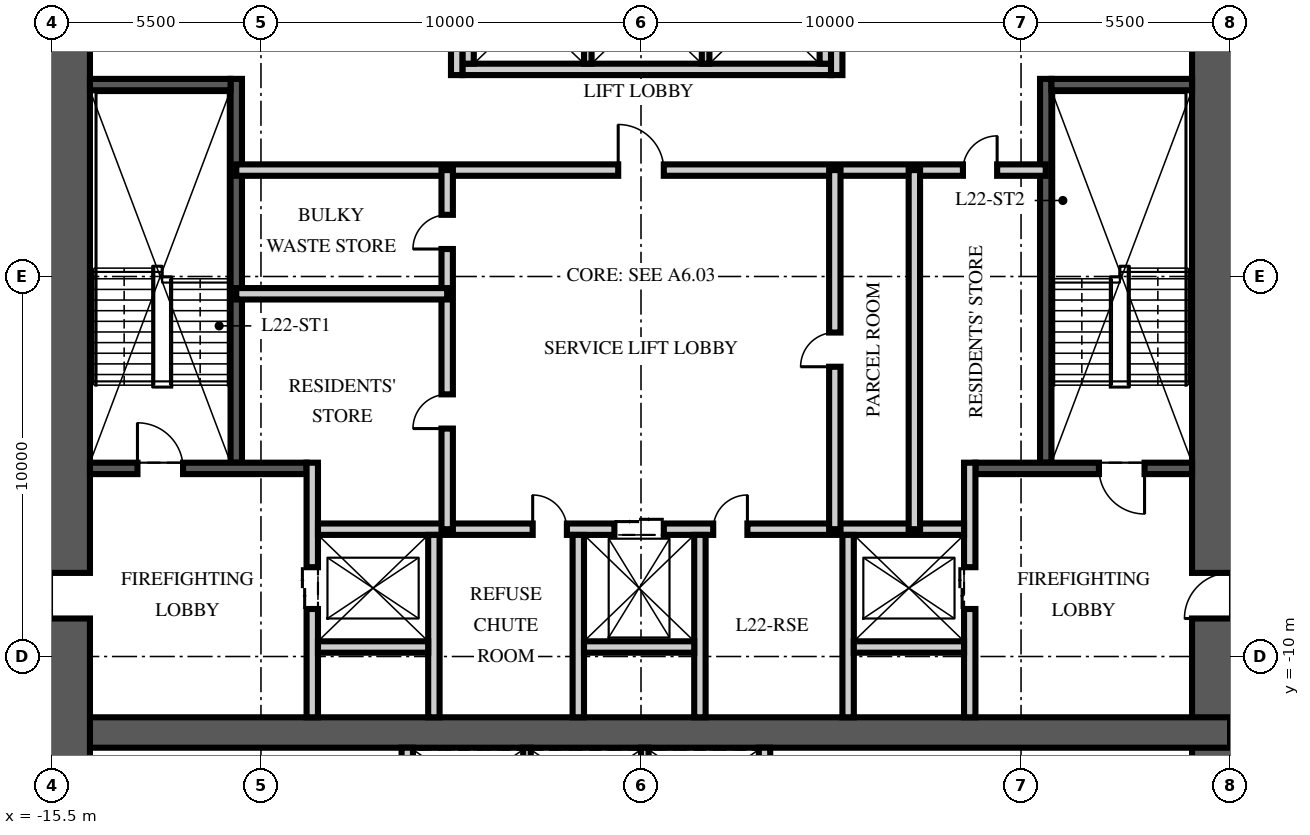
"""IFC4 building model, lengths in metres.
Left out: names, types, materials, properties, quantities, classifications, styles, units other than length and angle.
Written with IfcOpenShell. Run it as: python <this file> out.ifc"""

import sys

from ifc_helpers import new_model, si_unit, direction, frame, frame_2d, origin, place, context, subcontext, project, spatial, rectangle, extrude, element, fill, save


model = new_model("IFC4")
c1 = context("Model", 3, precision=1e-05, world=origin(), true_north=direction((0.0, 1.0)))
c2 = subcontext(c1, "Body", "Model", "MODEL_VIEW")
j1 = project(units=[si_unit("LENGTHUNIT", "METRE"), si_unit("PLANEANGLEUNIT", "RADIAN")], contexts=[c1])
p1 = place(None, origin())
s1 = spatial("IfcSite", under=j1, at=p1, CompositionType="ELEMENT")
p2 = place(p1, origin())
s2 = spatial("IfcBuilding", under=s1, at=p2, CompositionType="ELEMENT")
p3 = place(p2, frame((0.0, 0.0, 88.5)))
s3 = spatial("IfcBuildingStorey", under=s2, at=p3, CompositionType="ELEMENT", Elevation=88.5)
p4 = place(p3, frame((15.5, -15.5, -0.25), z_axis=(0.0, 0.0, 1.0), x_axis=(0.0, 1.0, 0.0)))
e1 = element("IfcWall", 1, at=p4, inside=s3, PredefinedType="SHEAR", context=c2, shape_type="SweptSolid", body=[
    extrude(rectangle(XDim=31.0, YDim=2.0, at=frame_2d((15.5, 0.0))), origin(), (0.0, 0.0, 1.0), 3.75),
])
p5 = place(p4, frame((6.5, 0.0, 0.25)))
e2 = element("IfcOpeningElement", 2, at=p5, cuts=e1, PredefinedType="OPENING", context=c2, shape_type="SweptSolid", body=[
    extrude(rectangle(XDim=1.2, YDim=2.1, at=frame_2d((0.6, 1.05))), frame((0.0, 1.01, 0.0), z_axis=(0.0, -1.0, 0.0), x_axis=(1.0, 0.0, 0.0)), (0.0, 0.0, 1.0), 2.02),
])
p6 = place(p4, frame((23.0, 0.0, 0.25)))
e3 = element("IfcOpeningElement", 3, at=p6, cuts=e1, PredefinedType="OPENING", context=c2, shape_type="SweptSolid", body=[
    extrude(rectangle(XDim=1.8, YDim=2.1, at=frame_2d((0.9, 1.05))), frame((0.0, 1.01, 0.0), z_axis=(0.0, -1.0, 0.0), x_axis=(1.0, 0.0, 0.0)), (0.0, 0.0, 1.0), 2.02),
])
p7 = place(p3, frame((-15.5, -12.0, -0.25), z_axis=(0.0, 0.0, 1.0), x_axis=(1.0, 0.0, 0.0)))
e4 = element("IfcWall", 4, at=p7, inside=s3, PredefinedType="SHEAR", context=c2, shape_type="SweptSolid", body=[
    extrude(rectangle(XDim=31.0, YDim=0.8, at=frame_2d((15.5, 0.0))), origin(), (0.0, 0.0, 1.0), 3.75),
])
p8 = place(p3, frame((-15.5, -15.5, -0.25), z_axis=(0.0, 0.0, 1.0), x_axis=(0.0, 1.0, 0.0)))
e5 = element("IfcWall", 5, at=p8, inside=s3, PredefinedType="SHEAR", context=c2, shape_type="SweptSolid", body=[
    extrude(rectangle(XDim=31.0, YDim=2.0, at=frame_2d((15.5, 0.0))), origin(), (0.0, 0.0, 1.0), 3.75),
])
p9 = place(p8, frame((6.5, 0.0, 0.25)))
e6 = element("IfcOpeningElement", 6, at=p9, cuts=e5, PredefinedType="OPENING", context=c2, shape_type="SweptSolid", body=[
    extrude(rectangle(XDim=1.2, YDim=2.1, at=frame_2d((0.6, 1.05))), frame((0.0, 1.01, 0.0), z_axis=(0.0, -1.0, 0.0), x_axis=(1.0, 0.0, 0.0)), (0.0, 0.0, 1.0), 2.02),
])
p10 = place(p8, frame((23.0, 0.0, 0.25)))
e7 = element("IfcOpeningElement", 7, at=p10, cuts=e5, PredefinedType="OPENING", context=c2, shape_type="SweptSolid", body=[
    extrude(rectangle(XDim=1.8, YDim=2.1, at=frame_2d((0.9, 1.05))), frame((0.0, 1.01, 0.0), z_axis=(0.0, -1.0, 0.0), x_axis=(1.0, 0.0, 0.0)), (0.0, 0.0, 1.0), 2.02),
])
p11 = place(p3, frame((-10.65, -4.9, 0.0), z_axis=(0.0, 0.0, 1.0), x_axis=(0.0, 1.0, 0.0)))
e8 = element("IfcWall", 8, at=p11, inside=s3, PredefinedType="SOLIDWALL", context=c2, shape_type="SweptSolid", body=[
    extrude(rectangle(XDim=10.1, YDim=0.3, at=frame_2d((5.05, 0.0))), origin(), (0.0, 0.0, 1.0), 3.5),
])
p12 = place(p3, frame((-14.5, -5.05, 0.0), z_axis=(0.0, 0.0, 1.0), x_axis=(1.0, 0.0, 0.0)))
e9 = element("IfcWall", 9, at=p12, inside=s3, PredefinedType="SOLIDWALL", context=c2, shape_type="SweptSolid", body=[
    extrude(rectangle(XDim=5.7, YDim=0.3, at=frame_2d((2.85, 0.0))), origin(), (0.0, 0.0, 1.0), 3.5),
])
p13 = place(p12, frame((1.25, 0.0, 0.0)))
e10 = element("IfcOpeningElement", 10, at=p13, cuts=e9, PredefinedType="OPENING", context=c2, shape_type="SweptSolid", body=[
    extrude(rectangle(XDim=1.2, YDim=2.1, at=frame_2d((0.6, 1.05))), frame((0.0, 0.16, 0.0), z_axis=(0.0, -1.0, 0.0), x_axis=(1.0, 0.0, 0.0)), (0.0, 0.0, 1.0), 0.32),
])
p14 = place(p3, frame((-14.5, 5.05, 0.0), z_axis=(0.0, 0.0, 1.0), x_axis=(1.0, 0.0, 0.0)))
e11 = element("IfcWall", 11, at=p14, inside=s3, PredefinedType="SOLIDWALL", context=c2, shape_type="SweptSolid", body=[
    extrude(rectangle(XDim=3.7, YDim=0.3, at=frame_2d((1.85, 0.0))), origin(), (0.0, 0.0, 1.0), 3.5),
])
p15 = place(p3, frame((-8.65, -11.6, 0.0), z_axis=(0.0, 0.0, 1.0), x_axis=(0.0, 1.0, 0.0)))
e12 = element("IfcWall", 12, at=p15, inside=s3, PredefinedType="PARTITIONING", context=c2, shape_type="SweptSolid", body=[
    extrude(rectangle(XDim=6.7, YDim=0.3, at=frame_2d((3.35, 0.0))), origin(), (0.0, 0.0, 1.0), 3.5),
])
p16 = place(p15, frame((2.85, 0.0, 0.0)))
e13 = element("IfcOpeningElement", 13, at=p16, cuts=e12, PredefinedType="OPENING", context=c2, shape_type="SweptSolid", body=[
    extrude(rectangle(XDim=1.1, YDim=2.1, at=frame_2d((0.55, 1.05))), frame((0.0, 0.16, 0.0), z_axis=(0.0, -1.0, 0.0), x_axis=(1.0, 0.0, 0.0)), (0.0, 0.0, 1.0), 0.32),
])
p17 = place(p3, frame((10.65, -4.9, 0.0), z_axis=(0.0, 0.0, 1.0), x_axis=(0.0, 1.0, 0.0)))
e14 = element("IfcWall", 14, at=p17, inside=s3, PredefinedType="SOLIDWALL", context=c2, shape_type="SweptSolid", body=[
    extrude(rectangle(XDim=10.1, YDim=0.3, at=frame_2d((5.05, 0.0))), origin(), (0.0, 0.0, 1.0), 3.5),
])
p18 = place(p3, frame((14.5, -5.05, 0.0), z_axis=(0.0, 0.0, 1.0), x_axis=(-1.0, 0.0, 0.0)))
e15 = element("IfcWall", 15, at=p18, inside=s3, PredefinedType="SOLIDWALL", context=c2, shape_type="SweptSolid", body=[
    extrude(rectangle(XDim=5.7, YDim=0.3, at=frame_2d((2.85, 0.0))), origin(), (0.0, 0.0, 1.0), 3.5),
])
p19 = place(p18, frame((1.25, 0.0, 0.0)))
e16 = element("IfcOpeningElement", 16, at=p19, cuts=e15, PredefinedType="OPENING", context=c2, shape_type="SweptSolid", body=[
    extrude(rectangle(XDim=1.2, YDim=2.1, at=frame_2d((0.6, 1.05))), frame((0.0, 0.16, 0.0), z_axis=(0.0, -1.0, 0.0), x_axis=(1.0, 0.0, 0.0)), (0.0, 0.0, 1.0), 0.32),
])
p20 = place(p3, frame((14.5, 5.05, 0.0), z_axis=(0.0, 0.0, 1.0), x_axis=(-1.0, 0.0, 0.0)))
e17 = element("IfcWall", 17, at=p20, inside=s3, PredefinedType="SOLIDWALL", context=c2, shape_type="SweptSolid", body=[
    extrude(rectangle(XDim=3.7, YDim=0.3, at=frame_2d((1.85, 0.0))), origin(), (0.0, 0.0, 1.0), 3.5),
])
p21 = place(p3, frame((8.65, -11.6, 0.0), z_axis=(0.0, 0.0, 1.0), x_axis=(0.0, 1.0, 0.0)))
e18 = element("IfcWall", 18, at=p21, inside=s3, PredefinedType="PARTITIONING", context=c2, shape_type="SweptSolid", body=[
    extrude(rectangle(XDim=6.7, YDim=0.3, at=frame_2d((3.35, 0.0))), origin(), (0.0, 0.0, 1.0), 3.5),
])
p22 = place(p21, frame((2.85, 0.0, 0.0)))
e19 = element("IfcOpeningElement", 19, at=p22, cuts=e18, PredefinedType="OPENING", context=c2, shape_type="SweptSolid", body=[
    extrude(rectangle(XDim=1.1, YDim=2.1, at=frame_2d((0.55, 1.05))), frame((0.0, 0.16, 0.0), z_axis=(0.0, -1.0, 0.0), x_axis=(1.0, 0.0, 0.0)), (0.0, 0.0, 1.0), 0.32),
])
p23 = place(p3, frame((-8.5, -6.65, 0.0), z_axis=(0.0, 0.0, 1.0), x_axis=(1.0, 0.0, 0.0)))
e20 = element("IfcWall", 20, at=p23, inside=s3, PredefinedType="PARTITIONING", context=c2, shape_type="SweptSolid", body=[
    extrude(rectangle(XDim=17.0, YDim=0.3, at=frame_2d((8.5, 0.0))), origin(), (0.0, 0.0, 1.0), 3.5),
])
p24 = place(p23, frame((7.8, 0.0, 0.0)))
e21 = element("IfcOpeningElement", 21, at=p24, cuts=e20, PredefinedType="OPENING", context=c2, shape_type="SweptSolid", body=[
    extrude(rectangle(XDim=1.3, YDim=2.4, at=frame_2d((0.65, 1.2))), frame((0.0, 0.16, 0.0), z_axis=(0.0, -1.0, 0.0), x_axis=(1.0, 0.0, 0.0)), (0.0, 0.0, 1.0), 0.32),
])
p25 = place(p23, frame((5.65, 0.0, 0.0)))
e22 = element("IfcOpeningElement", 22, at=p25, cuts=e20, PredefinedType="OPENING", context=c2, shape_type="SweptSolid", body=[
    extrude(rectangle(XDim=0.9, YDim=2.1, at=frame_2d((0.45, 1.05))), frame((0.0, 0.16, 0.0), z_axis=(0.0, -1.0, 0.0), x_axis=(1.0, 0.0, 0.0)), (0.0, 0.0, 1.0), 0.32),
])
p26 = place(p23, frame((10.4, 0.0, 0.0)))
e23 = element("IfcOpeningElement", 23, at=p26, cuts=e20, PredefinedType="OPENING", context=c2, shape_type="SweptSolid", body=[
    extrude(rectangle(XDim=0.9, YDim=2.1, at=frame_2d((0.45, 1.05))), frame((0.0, 0.16, 0.0), z_axis=(0.0, -1.0, 0.0), x_axis=(1.0, 0.0, 0.0)), (0.0, 0.0, 1.0), 0.32),
])
for number, where, z_axis, x_axis in (
    (24, (-5.45, -11.6, 0.0), (0.0, 0.0, 1.0), (0.0, 1.0, 0.0)),
    (25, (-1.65, -11.6, 0.0), (0.0, 0.0, 1.0), (0.0, 1.0, 0.0)),
    (26, (1.55, -11.6, 0.0), (0.0, 0.0, 1.0), (0.0, 1.0, 0.0)),
    (27, (5.45, -11.6, 0.0), (0.0, 0.0, 1.0), (0.0, 1.0, 0.0)),
):
    element("IfcWall", number, at=place(p3, frame(where, z_axis=z_axis, x_axis=x_axis)), inside=s3, PredefinedType="PARTITIONING", context=c2, shape_type="SweptSolid", body=[
        extrude(rectangle(XDim=4.8, YDim=0.3, at=frame_2d((2.4, 0.0))), origin(), (0.0, 0.0, 1.0), 3.5),
    ])
for number, where, z_axis, x_axis in (
    (28, (-8.5, -9.75, 0.0), (0.0, 0.0, 1.0), (1.0, 0.0, 0.0)),
    (29, (-1.5, -9.75, 0.0), (0.0, 0.0, 1.0), (1.0, 0.0, 0.0)),
    (30, (5.6, -9.75, 0.0), (0.0, 0.0, 1.0), (1.0, 0.0, 0.0)),
):
    element("IfcWall", number, at=place(p3, frame(where, z_axis=z_axis, x_axis=x_axis)), inside=s3, PredefinedType="PARTITIONING", context=c2, shape_type="SweptSolid", body=[
        extrude(rectangle(XDim=2.9, YDim=0.3, at=frame_2d((1.45, 0.0))), origin(), (0.0, 0.0, 1.0), 3.5),
    ])
p27 = place(p3, frame((-4.7, 5.45, 0.0), z_axis=(0.0, 0.0, 1.0), x_axis=(1.0, 0.0, 0.0)))
e31 = element("IfcWall", 31, at=p27, inside=s3, PredefinedType="PARTITIONING", context=c2, shape_type="SweptSolid", body=[
    extrude(rectangle(XDim=9.7, YDim=0.3, at=frame_2d((4.85, 0.0))), origin(), (0.0, 0.0, 1.0), 3.5),
])
for number, where, z_axis, x_axis in (
    (32, (-4.55, 5.6, 0.0), (0.0, 0.0, 1.0), (0.0, 1.0, 0.0)),
    (33, (4.85, 5.6, 0.0), (0.0, 0.0, 1.0), (0.0, 1.0, 0.0)),
):
    element("IfcWall", number, at=place(p3, frame(where, z_axis=z_axis, x_axis=x_axis)), inside=s3, PredefinedType="PARTITIONING", context=c2, shape_type="SweptSolid", body=[
        extrude(rectangle(XDim=2.8, YDim=0.3, at=frame_2d((1.4, 0.0))), origin(), (0.0, 0.0, 1.0), 3.5),
    ])
for number, where, z_axis, x_axis in (
    (34, (-1.4, 5.6, 0.0), (0.0, 0.0, 1.0), (0.0, 1.0, 0.0)),
    (35, (1.7, 5.6, 0.0), (0.0, 0.0, 1.0), (0.0, 1.0, 0.0)),
):
    element("IfcWall", number, at=place(p3, frame(where, z_axis=z_axis, x_axis=x_axis)), inside=s3, PredefinedType="PARTITIONING", context=c2, shape_type="SweptSolid", body=[
        extrude(rectangle(XDim=2.8, YDim=0.2, at=frame_2d((1.4, 0.0))), origin(), (0.0, 0.0, 1.0), 3.5),
    ])
for number, where, z_axis, x_axis in (
    (36, (-6.15, -14.5, 0.0), (0.0, 0.0, 1.0), (0.0, 1.0, 0.0)),
    (37, (3.25, -14.5, 0.0), (0.0, 0.0, 1.0), (0.0, 1.0, 0.0)),
):
    element("IfcWall", number, at=place(p3, frame(where, z_axis=z_axis, x_axis=x_axis)), inside=s3, PredefinedType="PARTITIONING", context=c2, shape_type="SweptSolid", body=[
        extrude(rectangle(XDim=2.1, YDim=0.3, at=frame_2d((1.05, 0.0))), origin(), (0.0, 0.0, 1.0), 3.5),
    ])
for number, where, z_axis, x_axis in (
    (38, (-3.0, -14.5, 0.0), (0.0, 0.0, 1.0), (0.0, 1.0, 0.0)),
    (39, (0.1, -14.5, 0.0), (0.0, 0.0, 1.0), (0.0, 1.0, 0.0)),
):
    element("IfcWall", number, at=place(p3, frame(where, z_axis=z_axis, x_axis=x_axis)), inside=s3, PredefinedType="PARTITIONING", context=c2, shape_type="SweptSolid", body=[
        extrude(rectangle(XDim=2.1, YDim=0.2, at=frame_2d((1.05, 0.0))), origin(), (0.0, 0.0, 1.0), 3.5),
    ])
p28 = place(p3, frame((-10.65, 2.8, 0.0), z_axis=(0.0, 0.0, 1.0), x_axis=(1.0, 0.0, 0.0)))
e40 = element("IfcWall", 40, at=p28, inside=s3, PredefinedType="PARTITIONING", context=c2, shape_type="SweptSolid", body=[
    extrude(rectangle(XDim=21.3, YDim=0.3, at=frame_2d((10.65, 0.0))), origin(), (0.0, 0.0, 1.0), 3.5),
])
p29 = place(p28, frame((10.05, 0.0, 0.0)))
e41 = element("IfcOpeningElement", 41, at=p29, cuts=e40, PredefinedType="OPENING", context=c2, shape_type="SweptSolid", body=[
    extrude(rectangle(XDim=1.2, YDim=2.1, at=frame_2d((0.6, 1.05))), frame((0.0, 0.16, 0.0), z_axis=(0.0, -1.0, 0.0), x_axis=(1.0, 0.0, 0.0)), (0.0, 0.0, 1.0), 0.32),
])
p30 = place(p28, frame((19.121, 0.0, 0.0)))
e42 = element("IfcOpeningElement", 42, at=p30, cuts=e40, PredefinedType="OPENING", context=c2, shape_type="SweptSolid", body=[
    extrude(rectangle(XDim=0.9, YDim=2.1, at=frame_2d((0.45, 1.05))), frame((0.0, 0.16, 0.0), z_axis=(0.0, -1.0, 0.0), x_axis=(1.0, 0.0, 0.0)), (0.0, 0.0, 1.0), 0.32),
])
p31 = place(p3, frame((-5.1, -6.65, 0.0), z_axis=(0.0, 0.0, 1.0), x_axis=(0.0, 1.0, 0.0)))
e43 = element("IfcWall", 43, at=p31, inside=s3, PredefinedType="PARTITIONING", context=c2, shape_type="SweptSolid", body=[
    extrude(rectangle(XDim=9.45, YDim=0.3, at=frame_2d((4.725, 0.0))), origin(), (0.0, 0.0, 1.0), 3.5),
])
p32 = place(p31, frame((2.648, 0.0, 0.0)))
e44 = element("IfcOpeningElement", 44, at=p32, cuts=e43, PredefinedType="OPENING", context=c2, shape_type="SweptSolid", body=[
    extrude(rectangle(XDim=0.9, YDim=2.1, at=frame_2d((0.45, 1.05))), frame((0.0, 0.16, 0.0), z_axis=(0.0, -1.0, 0.0), x_axis=(1.0, 0.0, 0.0)), (0.0, 0.0, 1.0), 0.32),
])
p33 = place(p31, frame((7.373, 0.0, 0.0)))
e45 = element("IfcOpeningElement", 45, at=p33, cuts=e43, PredefinedType="OPENING", context=c2, shape_type="SweptSolid", body=[
    extrude(rectangle(XDim=0.9, YDim=2.1, at=frame_2d((0.45, 1.05))), frame((0.0, 0.16, 0.0), z_axis=(0.0, -1.0, 0.0), x_axis=(1.0, 0.0, 0.0)), (0.0, 0.0, 1.0), 0.32),
])
p34 = place(p3, frame((5.1, -6.65, 0.0), z_axis=(0.0, 0.0, 1.0), x_axis=(0.0, 1.0, 0.0)))
e46 = element("IfcWall", 46, at=p34, inside=s3, PredefinedType="PARTITIONING", context=c2, shape_type="SweptSolid", body=[
    extrude(rectangle(XDim=9.45, YDim=0.3, at=frame_2d((4.725, 0.0))), origin(), (0.0, 0.0, 1.0), 3.5),
])
p35 = place(p34, frame((4.275, 0.0, 0.0)))
e47 = element("IfcOpeningElement", 47, at=p35, cuts=e46, PredefinedType="OPENING", context=c2, shape_type="SweptSolid", body=[
    extrude(rectangle(XDim=0.9, YDim=2.1, at=frame_2d((0.45, 1.05))), frame((0.0, 0.16, 0.0), z_axis=(0.0, -1.0, 0.0), x_axis=(1.0, 0.0, 0.0)), (0.0, 0.0, 1.0), 0.32),
])
p36 = place(p3, frame((-10.65, -0.455, 0.0), z_axis=(0.0, 0.0, 1.0), x_axis=(1.0, 0.0, 0.0)))
e48 = element("IfcWall", 48, at=p36, inside=s3, PredefinedType="PARTITIONING", context=c2, shape_type="SweptSolid", body=[
    extrude(rectangle(XDim=5.55, YDim=0.3, at=frame_2d((2.775, 0.0))), origin(), (0.0, 0.0, 1.0), 3.5),
])
p37 = place(p3, frame((7.193, -6.65, 0.0), z_axis=(0.0, 0.0, 1.0), x_axis=(0.0, 1.0, 0.0)))
e49 = element("IfcWall", 49, at=p37, inside=s3, PredefinedType="PARTITIONING", context=c2, shape_type="SweptSolid", body=[
    extrude(rectangle(XDim=9.45, YDim=0.3, at=frame_2d((4.725, 0.0))), origin(), (0.0, 0.0, 1.0), 3.5),
])
p38 = place(p3, frame((-4.85, 5.3, 0.0), z_axis=(0.0, 0.0, 1.0), x_axis=(0.0, 1.0, 0.0)))
e50 = element("IfcWall", 50, at=p38, inside=s3, PredefinedType="PARTITIONING", context=c2, shape_type="SweptSolid", body=[
    extrude(rectangle(XDim=6.3, YDim=0.3, at=frame_2d((3.15, 0.0))), origin(), (0.0, 0.0, 1.0), 3.5),
])
p39 = place(p38, frame((4.35, 0.0, 0.0)))
e51 = element("IfcOpeningElement", 51, at=p39, cuts=e50, PredefinedType="OPENING", context=c2, shape_type="SweptSolid", body=[
    extrude(rectangle(XDim=0.9, YDim=2.1, at=frame_2d((0.45, 1.05))), frame((0.0, 0.16, 0.0), z_axis=(0.0, -1.0, 0.0), x_axis=(1.0, 0.0, 0.0)), (0.0, 0.0, 1.0), 0.32),
])
p40 = place(p3, frame((5.15, 5.3, 0.0), z_axis=(0.0, 0.0, 1.0), x_axis=(0.0, 1.0, 0.0)))
e52 = element("IfcWall", 52, at=p40, inside=s3, PredefinedType="PARTITIONING", context=c2, shape_type="SweptSolid", body=[
    extrude(rectangle(XDim=6.3, YDim=0.3, at=frame_2d((3.15, 0.0))), origin(), (0.0, 0.0, 1.0), 3.5),
])
p41 = place(p13, origin())
e53 = element("IfcDoor", 53, at=p41, inside=s3, OperationType="SINGLE_SWING_LEFT", PredefinedType="DOOR", context=c2, shape_type="SweptSolid", body=[
    extrude(rectangle(XDim=1.2, YDim=2.1, at=frame_2d((0.6, 1.05))), frame((0.0, 0.025, 0.0), z_axis=(0.0, -1.0, 0.0), x_axis=(1.0, 0.0, 0.0)), (0.0, 0.0, 1.0), 0.05),
])
fill(e10, e53)
p42 = place(p9, origin())
e54 = element("IfcDoor", 54, at=p42, inside=s3, OperationType="SINGLE_SWING_LEFT", PredefinedType="DOOR", context=c2, shape_type="SweptSolid", body=[
    extrude(rectangle(XDim=1.2, YDim=2.1, at=frame_2d((0.6, 1.05))), frame((0.0, 0.025, 0.0), z_axis=(0.0, -1.0, 0.0), x_axis=(1.0, 0.0, 0.0)), (0.0, 0.0, 1.0), 0.05),
])
fill(e6, e54)
p43 = place(p19, origin())
e55 = element("IfcDoor", 55, at=p43, inside=s3, OperationType="SINGLE_SWING_LEFT", PredefinedType="DOOR", context=c2, shape_type="SweptSolid", body=[
    extrude(rectangle(XDim=1.2, YDim=2.1, at=frame_2d((0.6, 1.05))), frame((0.0, 0.025, 0.0), z_axis=(0.0, -1.0, 0.0), x_axis=(1.0, 0.0, 0.0)), (0.0, 0.0, 1.0), 0.05),
])
fill(e16, e55)
p44 = place(p5, origin())
e56 = element("IfcDoor", 56, at=p44, inside=s3, OperationType="SINGLE_SWING_LEFT", PredefinedType="DOOR", context=c2, shape_type="SweptSolid", body=[
    extrude(rectangle(XDim=1.2, YDim=2.1, at=frame_2d((0.6, 1.05))), frame((0.0, 0.025, 0.0), z_axis=(0.0, -1.0, 0.0), x_axis=(1.0, 0.0, 0.0)), (0.0, 0.0, 1.0), 0.05),
])
fill(e2, e56)
p45 = place(p16, origin())
e57 = element("IfcDoor", 57, at=p45, inside=s3, OperationType="DOUBLE_DOOR_SLIDING", PredefinedType="DOOR", context=c2, shape_type="SweptSolid", body=[
    extrude(rectangle(XDim=1.1, YDim=2.1, at=frame_2d((0.55, 1.05))), frame((0.0, 0.025, 0.0), z_axis=(0.0, -1.0, 0.0), x_axis=(1.0, 0.0, 0.0)), (0.0, 0.0, 1.0), 0.05),
])
fill(e13, e57)
p46 = place(p22, origin())
e58 = element("IfcDoor", 58, at=p46, inside=s3, OperationType="DOUBLE_DOOR_SLIDING", PredefinedType="DOOR", context=c2, shape_type="SweptSolid", body=[
    extrude(rectangle(XDim=1.1, YDim=2.1, at=frame_2d((0.55, 1.05))), frame((0.0, 0.025, 0.0), z_axis=(0.0, -1.0, 0.0), x_axis=(1.0, 0.0, 0.0)), (0.0, 0.0, 1.0), 0.05),
])
fill(e19, e58)
p47 = place(p24, origin())
e59 = element("IfcDoor", 59, at=p47, inside=s3, OperationType="DOUBLE_DOOR_SLIDING", PredefinedType="DOOR", context=c2, shape_type="SweptSolid", body=[
    extrude(rectangle(XDim=1.3, YDim=2.4, at=frame_2d((0.65, 1.2))), frame((0.0, 0.025, 0.0), z_axis=(0.0, -1.0, 0.0), x_axis=(1.0, 0.0, 0.0)), (0.0, 0.0, 1.0), 0.05),
])
fill(e21, e59)
p48 = place(p29, origin())
e60 = element("IfcDoor", 60, at=p48, inside=s3, OperationType="SINGLE_SWING_LEFT", PredefinedType="DOOR", context=c2, shape_type="SweptSolid", body=[
    extrude(rectangle(XDim=1.2, YDim=2.1, at=frame_2d((0.6, 1.05))), frame((0.0, 0.025, 0.0), z_axis=(0.0, -1.0, 0.0), x_axis=(1.0, 0.0, 0.0)), (0.0, 0.0, 1.0), 0.05),
])
fill(e41, e60)
p49 = place(p25, origin())
e61 = element("IfcDoor", 61, at=p49, inside=s3, OperationType="SINGLE_SWING_LEFT", PredefinedType="DOOR", context=c2, shape_type="SweptSolid", body=[
    extrude(rectangle(XDim=0.9, YDim=2.1, at=frame_2d((0.45, 1.05))), frame((0.0, 0.025, 0.0), z_axis=(0.0, -1.0, 0.0), x_axis=(1.0, 0.0, 0.0)), (0.0, 0.0, 1.0), 0.05),
])
fill(e22, e61)
p50 = place(p26, origin())
e62 = element("IfcDoor", 62, at=p50, inside=s3, OperationType="SINGLE_SWING_RIGHT", PredefinedType="DOOR", context=c2, shape_type="SweptSolid", body=[
    extrude(rectangle(XDim=0.9, YDim=2.1, at=frame_2d((0.45, 1.05))), frame((0.0, 0.025, 0.0), z_axis=(0.0, -1.0, 0.0), x_axis=(1.0, 0.0, 0.0)), (0.0, 0.0, 1.0), 0.05),
])
fill(e23, e62)
p51 = place(p32, origin())
e63 = element("IfcDoor", 63, at=p51, inside=s3, OperationType="SINGLE_SWING_LEFT", PredefinedType="DOOR", context=c2, shape_type="SweptSolid", body=[
    extrude(rectangle(XDim=0.9, YDim=2.1, at=frame_2d((0.45, 1.05))), frame((0.0, 0.025, 0.0), z_axis=(0.0, -1.0, 0.0), x_axis=(1.0, 0.0, 0.0)), (0.0, 0.0, 1.0), 0.05),
])
fill(e44, e63)
p52 = place(p33, origin())
e64 = element("IfcDoor", 64, at=p52, inside=s3, OperationType="SINGLE_SWING_LEFT", PredefinedType="DOOR", context=c2, shape_type="SweptSolid", body=[
    extrude(rectangle(XDim=0.9, YDim=2.1, at=frame_2d((0.45, 1.05))), frame((0.0, 0.025, 0.0), z_axis=(0.0, -1.0, 0.0), x_axis=(1.0, 0.0, 0.0)), (0.0, 0.0, 1.0), 0.05),
])
fill(e45, e64)
p53 = place(p35, origin())
e65 = element("IfcDoor", 65, at=p53, inside=s3, OperationType="SINGLE_SWING_LEFT", PredefinedType="DOOR", context=c2, shape_type="SweptSolid", body=[
    extrude(rectangle(XDim=0.9, YDim=2.1, at=frame_2d((0.45, 1.05))), frame((0.0, 0.025, 0.0), z_axis=(0.0, -1.0, 0.0), x_axis=(1.0, 0.0, 0.0)), (0.0, 0.0, 1.0), 0.05),
])
fill(e47, e65)
p54 = place(p30, origin())
e66 = element("IfcDoor", 66, at=p54, inside=s3, OperationType="SINGLE_SWING_RIGHT", PredefinedType="DOOR", context=c2, shape_type="SweptSolid", body=[
    extrude(rectangle(XDim=0.9, YDim=2.1, at=frame_2d((0.45, 1.05))), frame((0.0, 0.025, 0.0), z_axis=(0.0, -1.0, 0.0), x_axis=(1.0, 0.0, 0.0)), (0.0, 0.0, 1.0), 0.05),
])
fill(e42, e66)
save(model, sys.argv[1])
